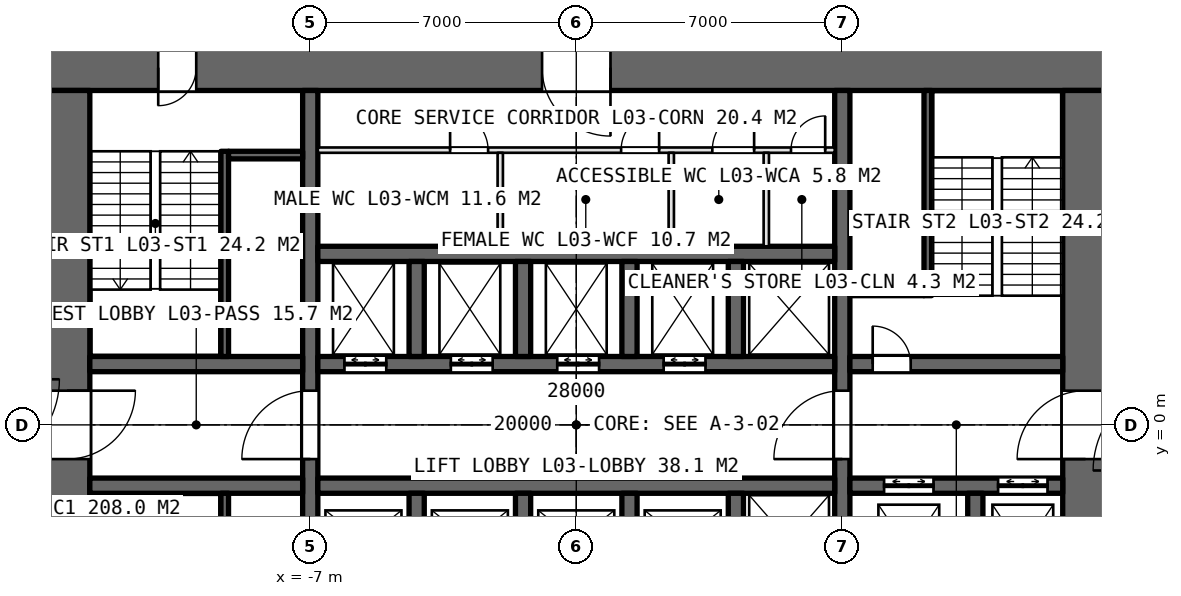
"""IFC4 building model, lengths in metres.
Left out: names, types, materials, properties, quantities, classifications, styles, units other than length and angle.
Written with IfcOpenShell. Run it as: python <this file> out.ifc"""

import sys

from ifc_helpers import new_model, si_unit, direction, frame, frame_2d, origin, place, context, subcontext, project, spatial, rectangle, extrude, element, fill, save


model = new_model("IFC4")
c1 = context("Model", 3, precision=1e-05, world=origin(), true_north=direction((0.0, 1.0)))
c2 = subcontext(c1, "Body", "Model", "MODEL_VIEW")
j1 = project(units=[si_unit("LENGTHUNIT", "METRE"), si_unit("PLANEANGLEUNIT", "RADIAN")], contexts=[c1])
p1 = place(None, origin())
s1 = spatial("IfcSite", under=j1, at=p1, CompositionType="ELEMENT")
p2 = place(p1, origin())
s2 = spatial("IfcBuilding", under=s1, at=p2, CompositionType="ELEMENT")
p3 = place(p2, frame((0.0, 0.0, 15.0)))
s3 = spatial("IfcBuildingStorey", under=s2, at=p3, CompositionType="ELEMENT", Elevation=15.0)
p4 = place(p3, frame((14.0, 9.4, 0.0), z_axis=(0.0, 0.0, 1.0), x_axis=(-1.0, 0.0, 0.0)))
e1 = element("IfcWall", 1, at=p4, inside=s3, PredefinedType="SHEAR", context=c2, shape_type="SweptSolid", body=[
    extrude(rectangle(XDim=28.0, YDim=1.2, at=frame_2d((14.0, 0.0))), origin(), (0.0, 0.0, 1.0), 5.0),
])
p5 = place(p4, frame((24.0, 0.0, 0.0)))
e2 = element("IfcOpeningElement", 2, at=p5, cuts=e1, PredefinedType="OPENING", context=c2, shape_type="SweptSolid", body=[
    extrude(rectangle(XDim=1.0, YDim=2.4, at=frame_2d((0.5, 1.2))), frame((0.0, 0.61, 0.0), z_axis=(0.0, -1.0, 0.0), x_axis=(1.0, 0.0, 0.0)), (0.0, 0.0, 1.0), 1.22),
])
p6 = place(p4, frame((13.1, 0.0, 0.0)))
e3 = element("IfcOpeningElement", 3, at=p6, cuts=e1, PredefinedType="OPENING", context=c2, shape_type="SweptSolid", body=[
    extrude(rectangle(XDim=1.8, YDim=2.4, at=frame_2d((0.9, 1.2))), frame((0.0, 0.61, 0.0), z_axis=(0.0, -1.0, 0.0), x_axis=(1.0, 0.0, 0.0)), (0.0, 0.0, 1.0), 1.22),
])
p7 = place(p3, frame((-13.4, 8.8, 0.0), z_axis=(0.0, 0.0, 1.0), x_axis=(0.0, -1.0, 0.0)))
e4 = element("IfcWall", 4, at=p7, inside=s3, PredefinedType="SHEAR", context=c2, shape_type="SweptSolid", body=[
    extrude(rectangle(XDim=17.6, YDim=1.2, at=frame_2d((8.8, 0.0))), origin(), (0.0, 0.0, 1.0), 5.0),
])
p8 = place(p7, frame((7.9, 0.0, 0.0)))
e5 = element("IfcOpeningElement", 5, at=p8, cuts=e4, PredefinedType="OPENING", context=c2, shape_type="SweptSolid", body=[
    extrude(rectangle(XDim=1.8, YDim=2.4, at=frame_2d((0.9, 1.2))), frame((0.0, 0.61, 0.0), z_axis=(0.0, -1.0, 0.0), x_axis=(1.0, 0.0, 0.0)), (0.0, 0.0, 1.0), 1.22),
])
p9 = place(p7, frame((16.5, 0.0, 0.0)))
e6 = element("IfcOpeningElement", 6, at=p9, cuts=e4, PredefinedType="OPENING", context=c2, shape_type="SweptSolid", body=[
    extrude(rectangle(XDim=1.0, YDim=2.4, at=frame_2d((0.5, 1.2))), frame((0.0, 0.61, 0.0), z_axis=(0.0, -1.0, 0.0), x_axis=(1.0, 0.0, 0.0)), (0.0, 0.0, 1.0), 1.22),
])
p10 = place(p3, frame((13.4, -8.8, 0.0), z_axis=(0.0, 0.0, 1.0), x_axis=(0.0, 1.0, 0.0)))
e7 = element("IfcWall", 7, at=p10, inside=s3, PredefinedType="SHEAR", context=c2, shape_type="SweptSolid", body=[
    extrude(rectangle(XDim=17.6, YDim=1.2, at=frame_2d((8.8, 0.0))), origin(), (0.0, 0.0, 1.0), 5.0),
])
p11 = place(p10, frame((7.9, 0.0, 0.0)))
e8 = element("IfcOpeningElement", 8, at=p11, cuts=e7, PredefinedType="OPENING", context=c2, shape_type="SweptSolid", body=[
    extrude(rectangle(XDim=1.8, YDim=2.4, at=frame_2d((0.9, 1.2))), frame((0.0, 0.61, 0.0), z_axis=(0.0, -1.0, 0.0), x_axis=(1.0, 0.0, 0.0)), (0.0, 0.0, 1.0), 1.22),
])
p12 = place(p3, frame((-7.0, -8.8, 0.0), z_axis=(0.0, 0.0, 1.0), x_axis=(0.0, 1.0, 0.0)))
e9 = element("IfcWall", 9, at=p12, inside=s3, PredefinedType="SHEAR", context=c2, shape_type="SweptSolid", body=[
    extrude(rectangle(XDim=17.6, YDim=0.4, at=frame_2d((8.8, 0.0))), origin(), (0.0, 0.0, 1.0), 5.0),
])
p13 = place(p12, frame((7.9, 0.0, 0.0)))
e10 = element("IfcOpeningElement", 10, at=p13, cuts=e9, PredefinedType="OPENING", context=c2, shape_type="SweptSolid", body=[
    extrude(rectangle(XDim=1.8, YDim=2.4, at=frame_2d((0.9, 1.2))), frame((0.0, 0.21, 0.0), z_axis=(0.0, -1.0, 0.0), x_axis=(1.0, 0.0, 0.0)), (0.0, 0.0, 1.0), 0.42),
])
p14 = place(p3, frame((7.0, -8.8, 0.0), z_axis=(0.0, 0.0, 1.0), x_axis=(0.0, 1.0, 0.0)))
e11 = element("IfcWall", 11, at=p14, inside=s3, PredefinedType="SHEAR", context=c2, shape_type="SweptSolid", body=[
    extrude(rectangle(XDim=17.6, YDim=0.4, at=frame_2d((8.8, 0.0))), origin(), (0.0, 0.0, 1.0), 5.0),
])
p15 = place(p14, frame((7.9, 0.0, 0.0)))
e12 = element("IfcOpeningElement", 12, at=p15, cuts=e11, PredefinedType="OPENING", context=c2, shape_type="SweptSolid", body=[
    extrude(rectangle(XDim=1.8, YDim=2.4, at=frame_2d((0.9, 1.2))), frame((0.0, 0.21, 0.0), z_axis=(0.0, -1.0, 0.0), x_axis=(1.0, 0.0, 0.0)), (0.0, 0.0, 1.0), 0.42),
])
p16 = place(p3, frame((-6.8, 1.6, 0.0), z_axis=(0.0, 0.0, 1.0), x_axis=(1.0, 0.0, 0.0)))
e13 = element("IfcWall", 13, at=p16, inside=s3, PredefinedType="SHEAR", context=c2, shape_type="SweptSolid", body=[
    extrude(rectangle(XDim=13.6, YDim=0.4, at=frame_2d((6.8, 0.0))), origin(), (0.0, 0.0, 1.0), 5.0),
])
p17 = place(p16, frame((0.7, 0.0, 0.0)))
e14 = element("IfcOpeningElement", 14, at=p17, cuts=e13, PredefinedType="OPENING", context=c2, shape_type="SweptSolid", body=[
    extrude(rectangle(XDim=1.1, YDim=2.4, at=frame_2d((0.55, 1.2))), frame((0.0, 0.21, 0.0), z_axis=(0.0, -1.0, 0.0), x_axis=(1.0, 0.0, 0.0)), (0.0, 0.0, 1.0), 0.42),
])
p18 = place(p16, frame((3.5, 0.0, 0.0)))
e15 = element("IfcOpeningElement", 15, at=p18, cuts=e13, PredefinedType="OPENING", context=c2, shape_type="SweptSolid", body=[
    extrude(rectangle(XDim=1.1, YDim=2.4, at=frame_2d((0.55, 1.2))), frame((0.0, 0.21, 0.0), z_axis=(0.0, -1.0, 0.0), x_axis=(1.0, 0.0, 0.0)), (0.0, 0.0, 1.0), 0.42),
])
p19 = place(p16, frame((6.3, 0.0, 0.0)))
e16 = element("IfcOpeningElement", 16, at=p19, cuts=e13, PredefinedType="OPENING", context=c2, shape_type="SweptSolid", body=[
    extrude(rectangle(XDim=1.1, YDim=2.4, at=frame_2d((0.55, 1.2))), frame((0.0, 0.21, 0.0), z_axis=(0.0, -1.0, 0.0), x_axis=(1.0, 0.0, 0.0)), (0.0, 0.0, 1.0), 0.42),
])
p20 = place(p16, frame((9.1, 0.0, 0.0)))
e17 = element("IfcOpeningElement", 17, at=p20, cuts=e13, PredefinedType="OPENING", context=c2, shape_type="SweptSolid", body=[
    extrude(rectangle(XDim=1.1, YDim=2.4, at=frame_2d((0.55, 1.2))), frame((0.0, 0.21, 0.0), z_axis=(0.0, -1.0, 0.0), x_axis=(1.0, 0.0, 0.0)), (0.0, 0.0, 1.0), 0.42),
])
for number, where, z_axis, x_axis in (
    (18, (-6.8, -1.6, 0.0), (0.0, 0.0, 1.0), (1.0, 0.0, 0.0)),
    (19, (-6.8, 4.5, 0.0), (0.0, 0.0, 1.0), (1.0, 0.0, 0.0)),
):
    element("IfcWall", number, at=place(p3, frame(where, z_axis=z_axis, x_axis=x_axis)), inside=s3, PredefinedType="SHEAR", context=c2, shape_type="SweptSolid", body=[
        extrude(rectangle(XDim=13.6, YDim=0.4, at=frame_2d((6.8, 0.0))), origin(), (0.0, 0.0, 1.0), 5.0),
    ])
for number, where, z_axis, x_axis in (
    (20, (-12.8, 1.6, 0.0), (0.0, 0.0, 1.0), (1.0, 0.0, 0.0)),
    (21, (-12.8, -1.6, 0.0), (0.0, 0.0, 1.0), (1.0, 0.0, 0.0)),
):
    element("IfcWall", number, at=place(p3, frame(where, z_axis=z_axis, x_axis=x_axis)), inside=s3, PredefinedType="SHEAR", context=c2, shape_type="SweptSolid", body=[
        extrude(rectangle(XDim=5.6, YDim=0.4, at=frame_2d((2.8, 0.0))), origin(), (0.0, 0.0, 1.0), 5.0),
    ])
p21 = place(p3, frame((7.2, 1.6, 0.0), z_axis=(0.0, 0.0, 1.0), x_axis=(1.0, 0.0, 0.0)))
e22 = element("IfcWall", 22, at=p21, inside=s3, PredefinedType="SHEAR", context=c2, shape_type="SweptSolid", body=[
    extrude(rectangle(XDim=5.6, YDim=0.4, at=frame_2d((2.8, 0.0))), origin(), (0.0, 0.0, 1.0), 5.0),
])
p22 = place(p21, frame((0.6, 0.0, 0.0)))
e23 = element("IfcOpeningElement", 23, at=p22, cuts=e22, PredefinedType="OPENING", context=c2, shape_type="SweptSolid", body=[
    extrude(rectangle(XDim=1.0, YDim=2.4, at=frame_2d((0.5, 1.2))), frame((0.0, 0.21, 0.0), z_axis=(0.0, -1.0, 0.0), x_axis=(1.0, 0.0, 0.0)), (0.0, 0.0, 1.0), 0.42),
])
p23 = place(p3, frame((7.2, -1.6, 0.0), z_axis=(0.0, 0.0, 1.0), x_axis=(1.0, 0.0, 0.0)))
e24 = element("IfcWall", 24, at=p23, inside=s3, PredefinedType="SHEAR", context=c2, shape_type="SweptSolid", body=[
    extrude(rectangle(XDim=5.6, YDim=0.4, at=frame_2d((2.8, 0.0))), origin(), (0.0, 0.0, 1.0), 5.0),
])
p24 = place(p23, frame((0.9, 0.0, 0.0)))
e25 = element("IfcOpeningElement", 25, at=p24, cuts=e24, PredefinedType="OPENING", context=c2, shape_type="SweptSolid", body=[
    extrude(rectangle(XDim=1.3, YDim=2.4, at=frame_2d((0.65, 1.2))), frame((0.0, 0.21, 0.0), z_axis=(0.0, -1.0, 0.0), x_axis=(1.0, 0.0, 0.0)), (0.0, 0.0, 1.0), 0.42),
])
p25 = place(p23, frame((3.9, 0.0, 0.0)))
e26 = element("IfcOpeningElement", 26, at=p25, cuts=e24, PredefinedType="OPENING", context=c2, shape_type="SweptSolid", body=[
    extrude(rectangle(XDim=1.3, YDim=2.4, at=frame_2d((0.65, 1.2))), frame((0.0, 0.21, 0.0), z_axis=(0.0, -1.0, 0.0), x_axis=(1.0, 0.0, 0.0)), (0.0, 0.0, 1.0), 0.42),
])
p26 = place(p3, frame((10.5, -4.8, 0.0), z_axis=(0.0, 0.0, 1.0), x_axis=(0.0, 1.0, 0.0)))
e27 = element("IfcWall", 27, at=p26, inside=s3, PredefinedType="SHEAR", context=c2, shape_type="SweptSolid", body=[
    extrude(rectangle(XDim=3.0, YDim=0.4, at=frame_2d((1.5, 0.0))), origin(), (0.0, 0.0, 1.0), 5.0),
])
for number, where, z_axis, x_axis in (
    (28, (-4.2, 1.8, 0.0), (0.0, 0.0, 1.0), (0.0, 1.0, 0.0)),
    (29, (-4.2, -4.3, 0.0), (0.0, 0.0, 1.0), (0.0, 1.0, 0.0)),
    (30, (-1.4, 1.8, 0.0), (0.0, 0.0, 1.0), (0.0, 1.0, 0.0)),
    (31, (-1.4, -4.3, 0.0), (0.0, 0.0, 1.0), (0.0, 1.0, 0.0)),
    (32, (1.4, 1.8, 0.0), (0.0, 0.0, 1.0), (0.0, 1.0, 0.0)),
    (33, (1.4, -4.3, 0.0), (0.0, 0.0, 1.0), (0.0, 1.0, 0.0)),
    (34, (4.2, 1.8, 0.0), (0.0, 0.0, 1.0), (0.0, 1.0, 0.0)),
    (35, (4.2, -4.3, 0.0), (0.0, 0.0, 1.0), (0.0, 1.0, 0.0)),
):
    element("IfcWall", number, at=place(p3, frame(where, z_axis=z_axis, x_axis=x_axis)), inside=s3, PredefinedType="SHEAR", context=c2, shape_type="SweptSolid", body=[
        extrude(rectangle(XDim=2.5, YDim=0.4, at=frame_2d((1.25, 0.0))), origin(), (0.0, 0.0, 1.0), 5.0),
    ])
p27 = place(p3, frame((-6.8, 7.23, 0.0), z_axis=(0.0, 0.0, 1.0), x_axis=(1.0, 0.0, 0.0)))
e36 = element("IfcWall", 36, at=p27, inside=s3, PredefinedType="PARTITIONING", context=c2, shape_type="SweptSolid", body=[
    extrude(rectangle(XDim=13.6, YDim=0.14, at=frame_2d((6.8, 0.0))), origin(), (0.0, 0.0, 1.0), 4.75),
])
p28 = place(p27, frame((3.48, 0.0, 0.0)))
e37 = element("IfcOpeningElement", 37, at=p28, cuts=e36, PredefinedType="OPENING", context=c2, shape_type="SweptSolid", body=[
    extrude(rectangle(XDim=1.0, YDim=2.4, at=frame_2d((0.5, 1.2))), frame((0.0, 0.08, 0.0), z_axis=(0.0, -1.0, 0.0), x_axis=(1.0, 0.0, 0.0)), (0.0, 0.0, 1.0), 0.16),
])
p29 = place(p27, frame((7.98, 0.0, 0.0)))
e38 = element("IfcOpeningElement", 38, at=p29, cuts=e36, PredefinedType="OPENING", context=c2, shape_type="SweptSolid", body=[
    extrude(rectangle(XDim=1.0, YDim=2.4, at=frame_2d((0.5, 1.2))), frame((0.0, 0.08, 0.0), z_axis=(0.0, -1.0, 0.0), x_axis=(1.0, 0.0, 0.0)), (0.0, 0.0, 1.0), 0.16),
])
p30 = place(p27, frame((10.38, 0.0, 0.0)))
e39 = element("IfcOpeningElement", 39, at=p30, cuts=e36, PredefinedType="OPENING", context=c2, shape_type="SweptSolid", body=[
    extrude(rectangle(XDim=1.1, YDim=2.4, at=frame_2d((0.55, 1.2))), frame((0.0, 0.08, 0.0), z_axis=(0.0, -1.0, 0.0), x_axis=(1.0, 0.0, 0.0)), (0.0, 0.0, 1.0), 0.16),
])
p31 = place(p27, frame((12.45, 0.0, 0.0)))
e40 = element("IfcOpeningElement", 40, at=p31, cuts=e36, PredefinedType="OPENING", context=c2, shape_type="SweptSolid", body=[
    extrude(rectangle(XDim=0.9, YDim=2.4, at=frame_2d((0.45, 1.2))), frame((0.0, 0.08, 0.0), z_axis=(0.0, -1.0, 0.0), x_axis=(1.0, 0.0, 0.0)), (0.0, 0.0, 1.0), 0.16),
])
for number, where, z_axis, x_axis in (
    (41, (-2.0, 4.7, 0.0), (0.0, 0.0, 1.0), (0.0, 1.0, 0.0)),
    (42, (2.5, 4.7, 0.0), (0.0, 0.0, 1.0), (0.0, 1.0, 0.0)),
    (43, (5.0, 4.7, 0.0), (0.0, 0.0, 1.0), (0.0, 1.0, 0.0)),
):
    element("IfcWall", number, at=place(p3, frame(where, z_axis=z_axis, x_axis=x_axis)), inside=s3, PredefinedType="PARTITIONING", context=c2, shape_type="SweptSolid", body=[
        extrude(rectangle(XDim=2.46, YDim=0.14, at=frame_2d((1.23, 0.0))), origin(), (0.0, 0.0, 1.0), 4.75),
    ])
p32 = place(p3, frame((-9.25, 7.2, 0.0), z_axis=(0.0, 0.0, 1.0), x_axis=(0.0, -1.0, 0.0)))
e44 = element("IfcWall", 44, at=p32, inside=s3, PredefinedType="SOLIDWALL", context=c2, shape_type="SweptSolid", body=[
    extrude(rectangle(XDim=5.4, YDim=0.2, at=frame_2d((2.7, 0.0))), origin(), (0.0, 0.0, 1.0), 5.0),
])
p33 = place(p3, frame((-9.15, 7.1, 0.0), z_axis=(0.0, 0.0, 1.0), x_axis=(1.0, 0.0, 0.0)))
e45 = element("IfcWall", 45, at=p33, inside=s3, PredefinedType="SOLIDWALL", context=c2, shape_type="SweptSolid", body=[
    extrude(rectangle(XDim=1.95, YDim=0.2, at=frame_2d((0.975, 0.0))), origin(), (0.0, 0.0, 1.0), 5.0),
])
p34 = place(p3, frame((-9.25, -7.2, 0.0), z_axis=(0.0, 0.0, 1.0), x_axis=(0.0, 1.0, 0.0)))
e46 = element("IfcWall", 46, at=p34, inside=s3, PredefinedType="SOLIDWALL", context=c2, shape_type="SweptSolid", body=[
    extrude(rectangle(XDim=5.4, YDim=0.2, at=frame_2d((2.7, 0.0))), origin(), (0.0, 0.0, 1.0), 5.0),
])
p35 = place(p3, frame((9.25, 3.4, 0.0), z_axis=(0.0, 0.0, 1.0), x_axis=(0.0, 1.0, 0.0)))
e47 = element("IfcWall", 47, at=p35, inside=s3, PredefinedType="SOLIDWALL", context=c2, shape_type="SweptSolid", body=[
    extrude(rectangle(XDim=5.4, YDim=0.2, at=frame_2d((2.7, 0.0))), origin(), (0.0, 0.0, 1.0), 5.0),
])
p36 = place(p3, frame((9.15, 3.5, 0.0), z_axis=(0.0, 0.0, 1.0), x_axis=(-1.0, 0.0, 0.0)))
e48 = element("IfcWall", 48, at=p36, inside=s3, PredefinedType="SOLIDWALL", context=c2, shape_type="SweptSolid", body=[
    extrude(rectangle(XDim=1.95, YDim=0.2, at=frame_2d((0.975, 0.0))), origin(), (0.0, 0.0, 1.0), 5.0),
])
p37 = place(p8, origin())
e49 = element("IfcDoor", 49, at=p37, inside=s3, OperationType="DOUBLE_DOOR_SINGLE_SWING", PredefinedType="DOOR", context=c2, shape_type="SweptSolid", body=[
    extrude(rectangle(XDim=1.8, YDim=2.4, at=frame_2d((0.9, 1.2))), frame((0.0, 0.025, 0.0), z_axis=(0.0, -1.0, 0.0), x_axis=(1.0, 0.0, 0.0)), (0.0, 0.0, 1.0), 0.05),
])
fill(e5, e49)
p38 = place(p11, origin())
e50 = element("IfcDoor", 50, at=p38, inside=s3, OperationType="DOUBLE_DOOR_SINGLE_SWING", PredefinedType="DOOR", context=c2, shape_type="SweptSolid", body=[
    extrude(rectangle(XDim=1.8, YDim=2.4, at=frame_2d((0.9, 1.2))), frame((0.0, 0.025, 0.0), z_axis=(0.0, -1.0, 0.0), x_axis=(1.0, 0.0, 0.0)), (0.0, 0.0, 1.0), 0.05),
])
fill(e8, e50)
p39 = place(p13, origin())
e51 = element("IfcDoor", 51, at=p39, inside=s3, OperationType="DOUBLE_DOOR_SINGLE_SWING", PredefinedType="DOOR", context=c2, shape_type="SweptSolid", body=[
    extrude(rectangle(XDim=1.8, YDim=2.4, at=frame_2d((0.9, 1.2))), frame((0.0, 0.025, 0.0), z_axis=(0.0, -1.0, 0.0), x_axis=(1.0, 0.0, 0.0)), (0.0, 0.0, 1.0), 0.05),
])
fill(e10, e51)
p40 = place(p15, origin())
e52 = element("IfcDoor", 52, at=p40, inside=s3, OperationType="DOUBLE_DOOR_SINGLE_SWING", PredefinedType="DOOR", context=c2, shape_type="SweptSolid", body=[
    extrude(rectangle(XDim=1.8, YDim=2.4, at=frame_2d((0.9, 1.2))), frame((0.0, 0.025, 0.0), z_axis=(0.0, -1.0, 0.0), x_axis=(1.0, 0.0, 0.0)), (0.0, 0.0, 1.0), 0.05),
])
fill(e12, e52)
p41 = place(p5, origin())
e53 = element("IfcDoor", 53, at=p41, inside=s3, OperationType="SINGLE_SWING_RIGHT", PredefinedType="DOOR", context=c2, shape_type="SweptSolid", body=[
    extrude(rectangle(XDim=1.0, YDim=2.4, at=frame_2d((0.5, 1.2))), frame((0.0, 0.025, 0.0), z_axis=(0.0, -1.0, 0.0), x_axis=(1.0, 0.0, 0.0)), (0.0, 0.0, 1.0), 0.05),
])
fill(e2, e53)
p42 = place(p22, origin())
e54 = element("IfcDoor", 54, at=p42, inside=s3, OperationType="SINGLE_SWING_LEFT", PredefinedType="DOOR", context=c2, shape_type="SweptSolid", body=[
    extrude(rectangle(XDim=1.0, YDim=2.4, at=frame_2d((0.5, 1.2))), frame((0.0, 0.025, 0.0), z_axis=(0.0, -1.0, 0.0), x_axis=(1.0, 0.0, 0.0)), (0.0, 0.0, 1.0), 0.05),
])
fill(e23, e54)
p43 = place(p28, origin())
e55 = element("IfcDoor", 55, at=p43, inside=s3, OperationType="SINGLE_SWING_LEFT", PredefinedType="DOOR", context=c2, shape_type="SweptSolid", body=[
    extrude(rectangle(XDim=1.0, YDim=2.4, at=frame_2d((0.5, 1.2))), frame((0.0, 0.025, 0.0), z_axis=(0.0, -1.0, 0.0), x_axis=(1.0, 0.0, 0.0)), (0.0, 0.0, 1.0), 0.05),
])
fill(e37, e55)
p44 = place(p29, origin())
e56 = element("IfcDoor", 56, at=p44, inside=s3, OperationType="SINGLE_SWING_RIGHT", PredefinedType="DOOR", context=c2, shape_type="SweptSolid", body=[
    extrude(rectangle(XDim=1.0, YDim=2.4, at=frame_2d((0.5, 1.2))), frame((0.0, 0.025, 0.0), z_axis=(0.0, -1.0, 0.0), x_axis=(1.0, 0.0, 0.0)), (0.0, 0.0, 1.0), 0.05),
])
fill(e38, e56)
p45 = place(p30, origin())
e57 = element("IfcDoor", 57, at=p45, inside=s3, OperationType="SINGLE_SWING_RIGHT", PredefinedType="DOOR", context=c2, shape_type="SweptSolid", body=[
    extrude(rectangle(XDim=1.1, YDim=2.4, at=frame_2d((0.55, 1.2))), frame((0.0, 0.025, 0.0), z_axis=(0.0, -1.0, 0.0), x_axis=(1.0, 0.0, 0.0)), (0.0, 0.0, 1.0), 0.05),
])
fill(e39, e57)
p46 = place(p31, origin())
e58 = element("IfcDoor", 58, at=p46, inside=s3, OperationType="SINGLE_SWING_RIGHT", PredefinedType="DOOR", context=c2, shape_type="SweptSolid", body=[
    extrude(rectangle(XDim=0.9, YDim=2.4, at=frame_2d((0.45, 1.2))), frame((0.0, 0.025, 0.0), z_axis=(0.0, -1.0, 0.0), x_axis=(1.0, 0.0, 0.0)), (0.0, 0.0, 1.0), 0.05),
])
fill(e40, e58)
p47 = place(p6, origin())
e59 = element("IfcDoor", 59, at=p47, inside=s3, OperationType="DOUBLE_DOOR_SINGLE_SWING", PredefinedType="DOOR", context=c2, shape_type="SweptSolid", body=[
    extrude(rectangle(XDim=1.8, YDim=2.4, at=frame_2d((0.9, 1.2))), frame((0.0, 0.025, 0.0), z_axis=(0.0, -1.0, 0.0), x_axis=(1.0, 0.0, 0.0)), (0.0, 0.0, 1.0), 0.05),
])
fill(e3, e59)
p48 = place(p17, origin())
e60 = element("IfcDoor", 60, at=p48, inside=s3, OperationType="DOUBLE_DOOR_SLIDING", PredefinedType="DOOR", context=c2, shape_type="SweptSolid", body=[
    extrude(rectangle(XDim=1.1, YDim=2.4, at=frame_2d((0.55, 1.2))), frame((0.0, 0.025, 0.0), z_axis=(0.0, -1.0, 0.0), x_axis=(1.0, 0.0, 0.0)), (0.0, 0.0, 1.0), 0.05),
])
fill(e14, e60)
p49 = place(p18, origin())
e61 = element("IfcDoor", 61, at=p49, inside=s3, OperationType="DOUBLE_DOOR_SLIDING", PredefinedType="DOOR", context=c2, shape_type="SweptSolid", body=[
    extrude(rectangle(XDim=1.1, YDim=2.4, at=frame_2d((0.55, 1.2))), frame((0.0, 0.025, 0.0), z_axis=(0.0, -1.0, 0.0), x_axis=(1.0, 0.0, 0.0)), (0.0, 0.0, 1.0), 0.05),
])
fill(e15, e61)
p50 = place(p19, origin())
e62 = element("IfcDoor", 62, at=p50, inside=s3, OperationType="DOUBLE_DOOR_SLIDING", PredefinedType="DOOR", context=c2, shape_type="SweptSolid", body=[
    extrude(rectangle(XDim=1.1, YDim=2.4, at=frame_2d((0.55, 1.2))), frame((0.0, 0.025, 0.0), z_axis=(0.0, -1.0, 0.0), x_axis=(1.0, 0.0, 0.0)), (0.0, 0.0, 1.0), 0.05),
])
fill(e16, e62)
p51 = place(p20, origin())
e63 = element("IfcDoor", 63, at=p51, inside=s3, OperationType="DOUBLE_DOOR_SLIDING", PredefinedType="DOOR", context=c2, shape_type="SweptSolid", body=[
    extrude(rectangle(XDim=1.1, YDim=2.4, at=frame_2d((0.55, 1.2))), frame((0.0, 0.025, 0.0), z_axis=(0.0, -1.0, 0.0), x_axis=(1.0, 0.0, 0.0)), (0.0, 0.0, 1.0), 0.05),
])
fill(e17, e63)
p52 = place(p24, origin())
e64 = element("IfcDoor", 64, at=p52, inside=s3, OperationType="DOUBLE_DOOR_SLIDING", PredefinedType="DOOR", context=c2, shape_type="SweptSolid", body=[
    extrude(rectangle(XDim=1.3, YDim=2.4, at=frame_2d((0.65, 1.2))), frame((0.0, 0.025, 0.0), z_axis=(0.0, -1.0, 0.0), x_axis=(1.0, 0.0, 0.0)), (0.0, 0.0, 1.0), 0.05),
])
fill(e25, e64)
p53 = place(p25, origin())
e65 = element("IfcDoor", 65, at=p53, inside=s3, OperationType="DOUBLE_DOOR_SLIDING", PredefinedType="DOOR", context=c2, shape_type="SweptSolid", body=[
    extrude(rectangle(XDim=1.3, YDim=2.4, at=frame_2d((0.65, 1.2))), frame((0.0, 0.025, 0.0), z_axis=(0.0, -1.0, 0.0), x_axis=(1.0, 0.0, 0.0)), (0.0, 0.0, 1.0), 0.05),
])
fill(e26, e65)
save(model, sys.argv[1])
